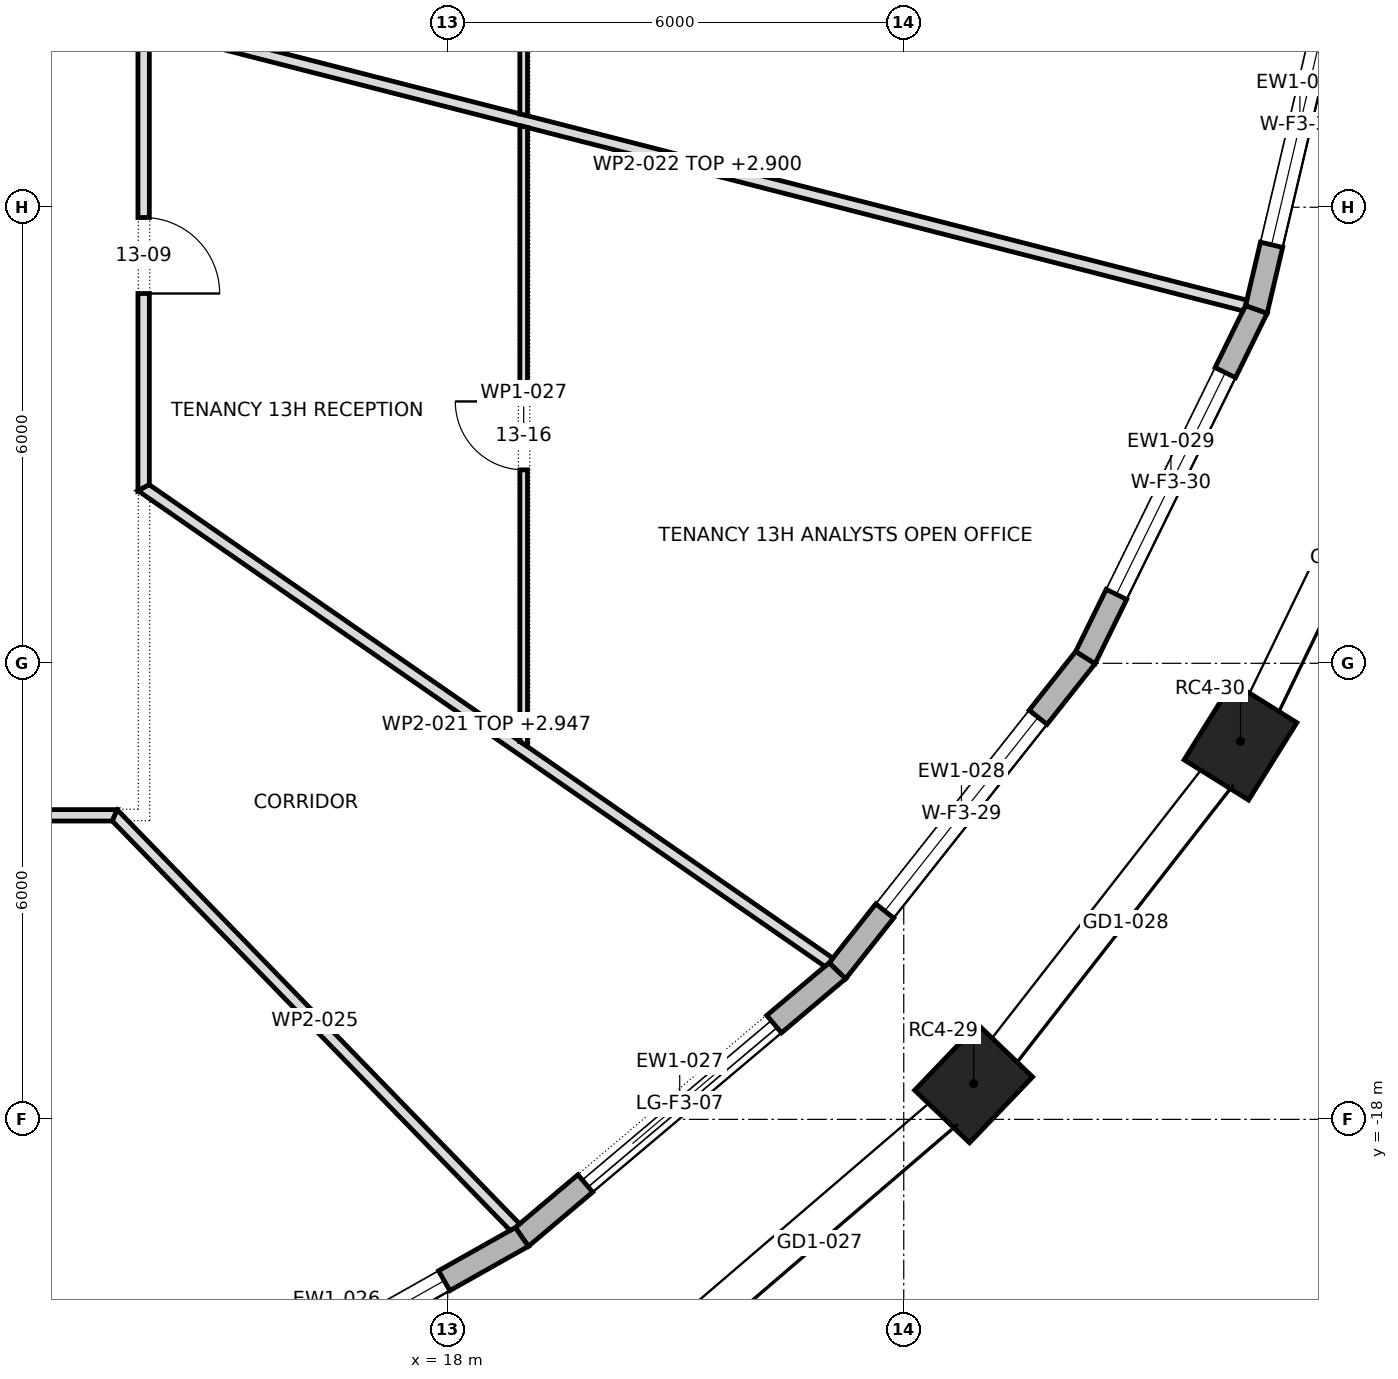
"""IFC4 building model, lengths in metres.
Left out: names, types, materials, properties, quantities, classifications, styles, units other than length and angle.
Written with IfcOpenShell. Run it as: python <this file> out.ifc"""

import sys

from ifc_helpers import new_model, si_unit, direction, frame, frame_2d, origin, origin_2d, place, context, subcontext, project, spatial, polyline, rectangle, outline, extrude, element, fill, save


model = new_model("IFC4")
c1 = context("Model", 3, precision=1e-05, world=origin(), true_north=direction((0.0, 1.0)))
c2 = subcontext(c1, "Body", "Model", "MODEL_VIEW")
j1 = project(units=[si_unit("LENGTHUNIT", "METRE"), si_unit("PLANEANGLEUNIT", "RADIAN")], contexts=[c1])
p1 = place(None, origin())
s1 = spatial("IfcSite", under=j1, at=p1, CompositionType="ELEMENT")
p2 = place(p1, origin())
s2 = spatial("IfcBuilding", under=s1, at=p2, CompositionType="ELEMENT")
p3 = place(p2, frame((0.0, 0.0, 198.9)))
s3 = spatial("IfcBuildingStorey", under=s2, at=p3, CompositionType="ELEMENT", Elevation=198.9)
for number, where, z_axis, x_axis in (
    (1, (24.919, -17.529, 0.0), (0.0, 0.0, 1.0), (0.692, 0.722, 0.0)),
    (2, (28.43, -13.025, 0.0), (0.0, 0.0, 1.0), (0.529, 0.849, 0.0)),
):
    element("IfcColumn", number, at=place(p3, frame(where, z_axis=z_axis, x_axis=x_axis)), inside=s3, PredefinedType="COLUMN", context=c2, shape_type="SweptSolid", body=[
        extrude(rectangle(XDim=1.2, YDim=1.0, at=origin_2d()), origin(), (0.0, 0.0, 1.0), 4.0),
    ])
p4 = place(p3, frame((14.1, -22.295, 0.0), z_axis=(0.0, 0.0, 1.0), x_axis=(0.871083701819, 0.491134588912, 0.0)))
e3 = element("IfcWall", 3, at=p4, inside=s3, PredefinedType="STANDARD", context=c2, shape_type="SweptSolid", body=[
    extrude(outline(polyline([(-0.013, -0.15), (5.614, -0.15), (5.585, 0.15), (0.013, 0.15), (-0.013, -0.15)])), origin(), (0.0, 0.0, 1.0), 3.7),
])
p5 = place(p4, frame((1.175, 0.0, 0.6)))
e4 = element("IfcOpeningElement", 4, at=p5, cuts=e3, PredefinedType="OPENING", context=c2, shape_type="SweptSolid", body=[
    extrude(rectangle(XDim=3.25, YDim=2.65, at=frame_2d((1.625, 1.325))), frame((0.0, 0.162, 0.0), z_axis=(0.0, -1.0, 0.0), x_axis=(1.0, 0.0, 0.0)), (0.0, 0.0, 1.0), 0.324),
])
p6 = place(p3, frame((18.977, -19.545, 0.0), z_axis=(0.0, 0.0, 1.0), x_axis=(0.764330261608, 0.644824977176, 0.0)))
e5 = element("IfcWall", 5, at=p6, inside=s3, PredefinedType="STANDARD", context=c2, shape_type="SweptSolid", body=[
    extrude(outline(polyline([(-0.014, -0.15), (5.445, -0.15), (5.415, 0.15), (0.014, 0.15), (-0.014, -0.15)])), origin(), (0.0, 0.0, 1.0), 3.7),
])
p7 = place(p6, frame((1.09, 0.0, 0.0)))
e6 = element("IfcOpeningElement", 6, at=p7, cuts=e5, PredefinedType="OPENING", context=c2, shape_type="SweptSolid", body=[
    extrude(rectangle(XDim=3.25, YDim=3.25, at=frame_2d((1.625, 1.625))), frame((0.0, 0.162, 0.0), z_axis=(0.0, -1.0, 0.0), x_axis=(1.0, 0.0, 0.0)), (0.0, 0.0, 1.0), 0.324),
])
p8 = place(p3, frame((23.128, -16.044, 0.0), z_axis=(0.0, 0.0, 1.0), x_axis=(0.620829074232, 0.783945955145, 0.0)))
e7 = element("IfcWall", 7, at=p8, inside=s3, PredefinedType="STANDARD", context=c2, shape_type="SweptSolid", body=[
    extrude(outline(polyline([(-0.015, -0.15), (5.271, -0.15), (5.239, 0.15), (0.015, 0.15), (-0.015, -0.15)])), origin(), (0.0, 0.0, 1.0), 3.7),
])
p9 = place(p8, frame((1.003, 0.0, 0.6)))
e8 = element("IfcOpeningElement", 8, at=p9, cuts=e7, PredefinedType="OPENING", context=c2, shape_type="SweptSolid", body=[
    extrude(rectangle(XDim=3.25, YDim=2.65, at=frame_2d((1.625, 1.325))), frame((0.0, 0.162, 0.0), z_axis=(0.0, -1.0, 0.0), x_axis=(1.0, 0.0, 0.0)), (0.0, 0.0, 1.0), 0.324),
])
p10 = place(p3, frame((26.39, -11.924, 0.0), z_axis=(0.0, 0.0, 1.0), x_axis=(0.440694221881, 0.897657285829, 0.0)))
e9 = element("IfcWall", 9, at=p10, inside=s3, PredefinedType="STANDARD", context=c2, shape_type="SweptSolid", body=[
    extrude(outline(polyline([(-0.016, -0.15), (5.119, -0.15), (5.085, 0.15), (0.016, 0.15), (-0.016, -0.15)])), origin(), (0.0, 0.0, 1.0), 3.7),
])
p11 = place(p10, frame((0.926, 0.0, 0.6)))
e10 = element("IfcOpeningElement", 10, at=p11, cuts=e9, PredefinedType="OPENING", context=c2, shape_type="SweptSolid", body=[
    extrude(rectangle(XDim=3.25, YDim=2.65, at=frame_2d((1.625, 1.325))), frame((0.0, 0.162, 0.0), z_axis=(0.0, -1.0, 0.0), x_axis=(1.0, 0.0, 0.0)), (0.0, 0.0, 1.0), 0.324),
])
p12 = place(p3, frame((28.639, -7.344, 0.0), z_axis=(0.0, 0.0, 1.0), x_axis=(0.229455912692, 0.97331905567, 0.0)))
e11 = element("IfcWall", 11, at=p12, inside=s3, PredefinedType="STANDARD", context=c2, shape_type="SweptSolid", body=[
    extrude(outline(polyline([(-0.017, -0.15), (5.015, -0.15), (4.98, 0.15), (0.017, 0.15), (-0.017, -0.15)])), origin(), (0.0, 0.0, 1.0), 3.7),
])
p13 = place(p12, frame((0.874, 0.0, 0.6)))
e12 = element("IfcOpeningElement", 12, at=p13, cuts=e11, PredefinedType="OPENING", context=c2, shape_type="SweptSolid", body=[
    extrude(rectangle(XDim=3.25, YDim=2.65, at=frame_2d((1.625, 1.325))), frame((0.0, 0.162, 0.0), z_axis=(0.0, -1.0, 0.0), x_axis=(1.0, 0.0, 0.0)), (0.0, 0.0, 1.0), 0.324),
])
p14 = place(p3, frame((-1.63, -14.0, 0.0), z_axis=(0.0, 0.0, 1.0), x_axis=(1.0, 0.0, 0.0)))
e13 = element("IfcWall", 13, at=p14, inside=s3, PredefinedType="PARTITIONING", context=c2, shape_type="SweptSolid", body=[
    extrude(outline(polyline([(0.0, -0.075), (1.902, -0.075), (3.804, -0.075), (5.707, -0.075), (7.609, -0.075), (9.511, -0.075), (11.414, -0.075), (13.316, -0.075), (15.218, -0.075), (15.281, 0.075), (15.281, 0.075), (13.371, 0.075), (11.461, 0.075), (9.551, 0.075), (7.641, 0.075), (5.73, 0.075), (3.82, 0.075), (1.91, 0.075), (0.0, 0.075), (0.0, -0.075)])), origin(), (0.0, 0.0, 1.0), 3.7),
])
p15 = place(p14, frame((2.83, 0.0, 0.0)))
e14 = element("IfcOpeningElement", 14, at=p15, cuts=e13, PredefinedType="OPENING", context=c2, shape_type="SweptSolid", body=[
    extrude(rectangle(XDim=1.0, YDim=2.1, at=frame_2d((0.5, 1.05))), frame((0.0, 0.087, 0.0), z_axis=(0.0, -1.0, 0.0), x_axis=(1.0, 0.0, 0.0)), (0.0, 0.0, 1.0), 0.174),
])
p16 = place(p14, frame((10.455, 0.0, 0.0)))
e15 = element("IfcOpeningElement", 15, at=p16, cuts=e13, PredefinedType="OPENING", context=c2, shape_type="SweptSolid", body=[
    extrude(rectangle(XDim=1.0, YDim=2.1, at=frame_2d((0.5, 1.05))), frame((0.0, 0.087, 0.0), z_axis=(0.0, -1.0, 0.0), x_axis=(1.0, 0.0, 0.0)), (0.0, 0.0, 1.0), 0.174),
])
p17 = place(p3, frame((14.0, -9.729, 0.0), z_axis=(0.0, 0.0, 1.0), x_axis=(0.0, 1.0, 0.0)))
e16 = element("IfcWall", 16, at=p17, inside=s3, PredefinedType="PARTITIONING", context=c2, shape_type="SweptSolid", body=[
    extrude(outline(polyline([(0.079, -0.075), (2.009, -0.075), (3.939, -0.075), (5.869, -0.075), (7.799, -0.075), (9.729, -0.075), (11.659, -0.075), (13.59, -0.075), (15.52, -0.075), (17.45, -0.075), (19.38, -0.075), (19.458, 0.075), (19.458, 0.075), (17.513, 0.075), (15.567, 0.075), (13.621, 0.075), (11.675, 0.075), (9.729, 0.075), (7.783, 0.075), (5.838, 0.075), (3.892, 0.075), (1.946, 0.075), (0.0, 0.075), (0.0, 0.075), (0.079, -0.075)])), origin(), (0.0, 0.0, 1.0), 3.7),
])
p18 = place(p17, frame((2.594, 0.0, 0.0)))
e17 = element("IfcOpeningElement", 17, at=p18, cuts=e16, PredefinedType="OPENING", context=c2, shape_type="SweptSolid", body=[
    extrude(rectangle(XDim=1.0, YDim=2.1, at=frame_2d((0.5, 1.05))), frame((0.0, 0.087, 0.0), z_axis=(0.0, -1.0, 0.0), x_axis=(1.0, 0.0, 0.0)), (0.0, 0.0, 1.0), 0.174),
])
p19 = place(p17, frame((9.229, 0.0, 0.0)))
e18 = element("IfcOpeningElement", 18, at=p19, cuts=e16, PredefinedType="OPENING", context=c2, shape_type="SweptSolid", body=[
    extrude(rectangle(XDim=1.0, YDim=2.1, at=frame_2d((0.5, 1.05))), frame((0.0, 0.087, 0.0), z_axis=(0.0, -1.0, 0.0), x_axis=(1.0, 0.0, 0.0)), (0.0, 0.0, 1.0), 0.174),
])
p20 = place(p17, frame((15.864, 0.0, 0.0)))
e19 = element("IfcOpeningElement", 19, at=p20, cuts=e16, PredefinedType="OPENING", context=c2, shape_type="SweptSolid", body=[
    extrude(rectangle(XDim=1.0, YDim=2.1, at=frame_2d((0.5, 1.05))), frame((0.0, 0.087, 0.0), z_axis=(0.0, -1.0, 0.0), x_axis=(1.0, 0.0, 0.0)), (0.0, 0.0, 1.0), 0.174),
])
p21 = place(p3, frame((13.968, -9.667, 0.0), z_axis=(0.0, 0.0, 1.0), x_axis=(0.822097241007, -0.569347105313, 0.0)))
e20 = element("IfcWall", 20, at=p21, inside=s3, PredefinedType="PARTITIONING", context=c2, shape_type="SweptSolid", body=[
    extrude(outline(polyline([(0.0, -0.075), (1.832, -0.075), (3.664, -0.075), (5.496, -0.075), (7.328, -0.075), (9.16, -0.075), (10.992, -0.075), (11.012, -0.002), (11.017, 0.07), (11.017, 0.075), (9.349, 0.075), (7.682, 0.075), (6.014, 0.075), (6.01, 0.072), (6.009, 0.075), (4.032, 0.075), (2.055, 0.075), (0.079, 0.075), (0.039, -0.0), (0.0, -0.075)])), origin(), (0.0, 0.0, 1.0), 2.947),
])
p22 = place(p3, frame((14.057, -3.594, 0.0), z_axis=(0.0, 0.0, 1.0), x_axis=(0.96870063855, -0.248231893342, 0.0)))
e21 = element("IfcWall", 21, at=p22, inside=s3, PredefinedType="PARTITIONING", context=c2, shape_type="SweptSolid", body=[
    extrude(outline(polyline([(0.038, -0.075), (1.748, -0.075), (3.458, -0.075), (5.168, -0.075), (5.174, -0.073), (5.174, -0.075), (7.117, -0.075), (9.061, -0.075), (11.004, -0.075), (12.947, -0.075), (14.89, -0.075), (14.904, -0.008), (14.904, 0.075), (12.931, 0.075), (10.958, 0.075), (8.985, 0.075), (7.011, 0.075), (5.038, 0.075), (5.033, 0.073), (5.032, 0.075), (3.355, 0.075), (1.677, 0.075), (0.0, 0.075), (0.0, 0.074), (0.038, -0.075)])), origin(), (0.0, 0.0, 1.0), 2.9),
])
p23 = place(p3, frame((18.893, -19.427, 0.0), z_axis=(0.0, 0.0, 1.0), x_axis=(-0.696864554069, 0.717202756048, 0.0)))
e22 = element("IfcWall", 22, at=p23, inside=s3, PredefinedType="PARTITIONING", context=c2, shape_type="SweptSolid", body=[
    extrude(outline(polyline([(0.0, -0.075), (1.9, -0.075), (3.799, -0.075), (5.699, -0.075), (7.599, -0.075), (7.567, 0.0), (7.535, 0.075), (5.658, 0.075), (3.78, 0.075), (1.903, 0.075), (0.025, 0.075), (0.005, -0.003), (0.0, -0.073), (0.0, -0.075)])), origin(), (0.0, 0.0, 1.0), 3.7),
])
p24 = place(p3, frame((19.0, -4.926, 0.0), z_axis=(0.0, 0.0, 1.0), x_axis=(0.0, -1.0, 0.0)))
e23 = element("IfcWall", 23, at=p24, inside=s3, PredefinedType="PARTITIONING", context=c2, shape_type="SweptSolid", body=[
    extrude(outline(polyline([(0.0, -0.05), (1.62, -0.05), (3.24, -0.05), (4.86, -0.05), (6.481, -0.05), (8.101, -0.05), (8.169, 0.049), (8.169, 0.05), (6.541, 0.05), (4.912, 0.05), (3.283, 0.05), (1.654, 0.05), (0.025, 0.05), (0.0, -0.049), (0.0, -0.05)])), origin(), (0.0, 0.0, 1.0), 3.7),
])
p25 = place(p24, frame((3.629, 0.0, 0.0)))
e24 = element("IfcOpeningElement", 24, at=p25, cuts=e23, PredefinedType="OPENING", context=c2, shape_type="SweptSolid", body=[
    extrude(rectangle(XDim=0.9, YDim=2.1, at=frame_2d((0.45, 1.05))), frame((0.0, 0.062, 0.0), z_axis=(0.0, -1.0, 0.0), x_axis=(1.0, 0.0, 0.0)), (0.0, 0.0, 1.0), 0.124),
])
p26 = place(p3, frame((19.0, 4.796, 0.0), z_axis=(0.0, 0.0, 1.0), x_axis=(0.0, -1.0, 0.0)))
e25 = element("IfcWall", 25, at=p26, inside=s3, PredefinedType="PARTITIONING", context=c2, shape_type="SweptSolid", body=[
    extrude(outline(polyline([(0.025, -0.05), (1.934, -0.05), (3.842, -0.05), (5.75, -0.05), (7.659, -0.05), (9.567, -0.05), (9.593, 0.049), (9.593, 0.05), (7.674, 0.05), (5.756, 0.05), (3.837, 0.05), (1.918, 0.05), (0.0, 0.05), (0.0, 0.049), (0.025, -0.05)])), origin(), (0.0, 0.0, 1.0), 3.7),
])
p27 = place(p26, frame((4.346, 0.0, 0.0)))
e26 = element("IfcOpeningElement", 26, at=p27, cuts=e25, PredefinedType="OPENING", context=c2, shape_type="SweptSolid", body=[
    extrude(rectangle(XDim=0.9, YDim=2.1, at=frame_2d((0.45, 1.05))), frame((0.0, 0.062, 0.0), z_axis=(0.0, -1.0, 0.0), x_axis=(1.0, 0.0, 0.0)), (0.0, 0.0, 1.0), 0.124),
])
p28 = place(p5, origin())
e27 = element("IfcWindow", 27, at=p28, inside=s3, PartitioningType="TRIPLE_PANEL_VERTICAL", PredefinedType="WINDOW", context=c2, shape_type="SweptSolid", body=[
    extrude(rectangle(XDim=3.25, YDim=2.65, at=frame_2d((1.625, 1.325))), frame((0.0, 0.03, 0.0), z_axis=(0.0, -1.0, 0.0), x_axis=(1.0, 0.0, 0.0)), (0.0, 0.0, 1.0), 0.06),
])
fill(e4, e27)
p29 = place(p7, origin())
e28 = element("IfcDoor", 28, at=p29, inside=s3, OperationType="DOUBLE_DOOR_SLIDING", PredefinedType="DOOR", context=c2, shape_type="SweptSolid", body=[
    extrude(rectangle(XDim=3.25, YDim=3.25, at=frame_2d((1.625, 1.625))), frame((0.0, 0.025, 0.0), z_axis=(0.0, -1.0, 0.0), x_axis=(1.0, 0.0, 0.0)), (0.0, 0.0, 1.0), 0.05),
])
fill(e6, e28)
p30 = place(p9, origin())
e29 = element("IfcWindow", 29, at=p30, inside=s3, PartitioningType="TRIPLE_PANEL_VERTICAL", PredefinedType="WINDOW", context=c2, shape_type="SweptSolid", body=[
    extrude(rectangle(XDim=3.25, YDim=2.65, at=frame_2d((1.625, 1.325))), frame((0.0, 0.03, 0.0), z_axis=(0.0, -1.0, 0.0), x_axis=(1.0, 0.0, 0.0)), (0.0, 0.0, 1.0), 0.06),
])
fill(e8, e29)
p31 = place(p11, origin())
e30 = element("IfcWindow", 30, at=p31, inside=s3, PartitioningType="TRIPLE_PANEL_VERTICAL", PredefinedType="WINDOW", context=c2, shape_type="SweptSolid", body=[
    extrude(rectangle(XDim=3.25, YDim=2.65, at=frame_2d((1.625, 1.325))), frame((0.0, 0.03, 0.0), z_axis=(0.0, -1.0, 0.0), x_axis=(1.0, 0.0, 0.0)), (0.0, 0.0, 1.0), 0.06),
])
fill(e10, e30)
p32 = place(p13, origin())
e31 = element("IfcWindow", 31, at=p32, inside=s3, PartitioningType="TRIPLE_PANEL_VERTICAL", PredefinedType="WINDOW", context=c2, shape_type="SweptSolid", body=[
    extrude(rectangle(XDim=3.25, YDim=2.65, at=frame_2d((1.625, 1.325))), frame((0.0, 0.03, 0.0), z_axis=(0.0, -1.0, 0.0), x_axis=(1.0, 0.0, 0.0)), (0.0, 0.0, 1.0), 0.06),
])
fill(e12, e31)
p33 = place(p18, frame((1.0, 0.0, 0.0), z_axis=(0.0, 0.0, 1.0), x_axis=(-1.0, 0.0, 0.0)))
e32 = element("IfcDoor", 32, at=p33, inside=s3, OperationType="SINGLE_SWING_LEFT", PredefinedType="DOOR", context=c2, shape_type="SweptSolid", body=[
    extrude(rectangle(XDim=1.0, YDim=2.1, at=frame_2d((0.5, 1.05))), frame((0.0, 0.025, 0.0), z_axis=(0.0, -1.0, 0.0), x_axis=(1.0, 0.0, 0.0)), (0.0, 0.0, 1.0), 0.05),
])
fill(e17, e32)
p34 = place(p25, frame((0.9, 0.0, 0.0), z_axis=(0.0, 0.0, 1.0), x_axis=(-1.0, 0.0, 0.0)))
e33 = element("IfcDoor", 33, at=p34, inside=s3, OperationType="SINGLE_SWING_LEFT", PredefinedType="DOOR", context=c2, shape_type="SweptSolid", body=[
    extrude(rectangle(XDim=0.9, YDim=2.1, at=frame_2d((0.45, 1.05))), frame((0.0, 0.025, 0.0), z_axis=(0.0, -1.0, 0.0), x_axis=(1.0, 0.0, 0.0)), (0.0, 0.0, 1.0), 0.05),
])
fill(e24, e33)
save(model, sys.argv[1])
